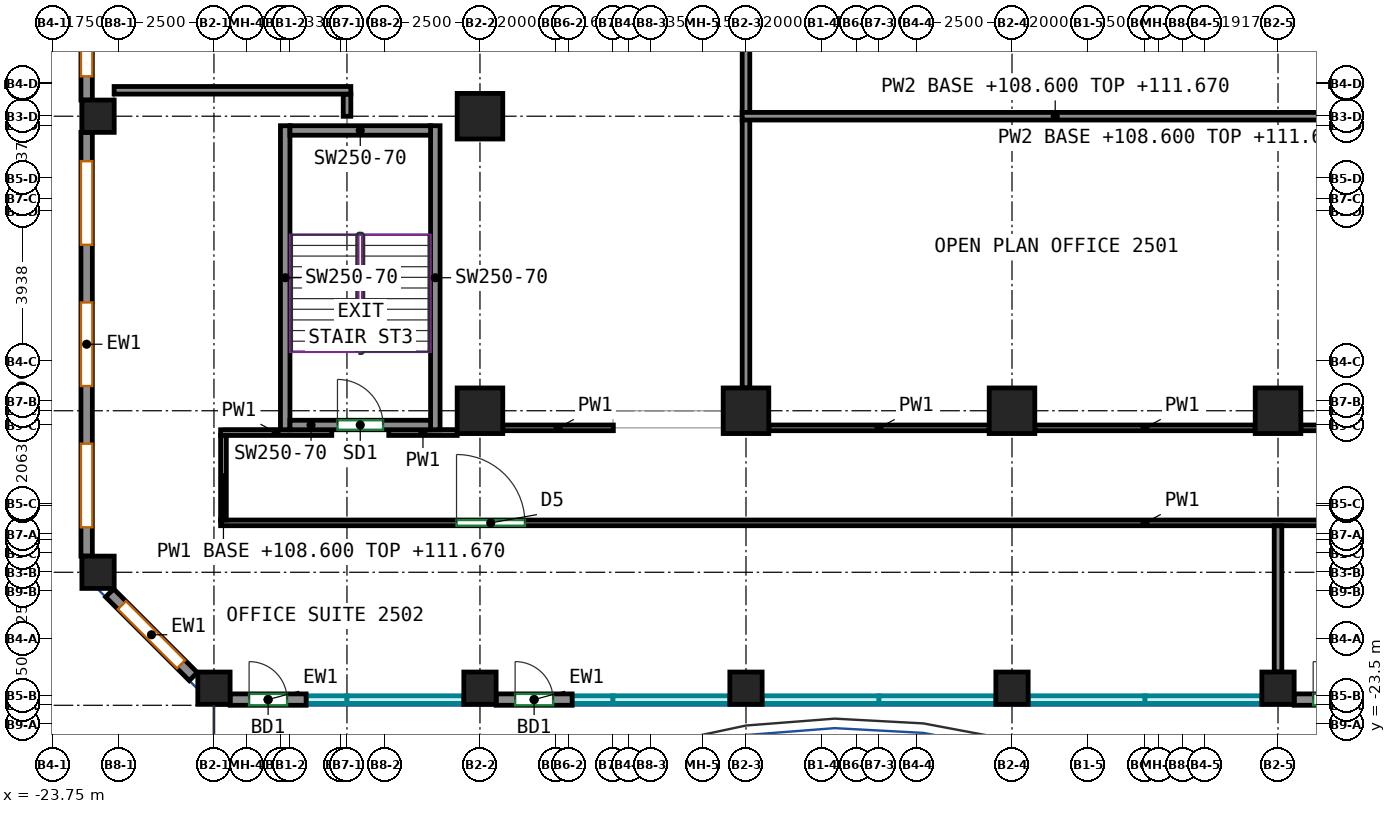
"""IFC4 building model, lengths in metres.
Left out: names, types, materials, properties, quantities, classifications, styles, units other than length and angle.
Written with IfcOpenShell. Run it as: python <this file> out.ifc"""

import sys

from ifc_helpers import new_model, si_unit, direction, frame, frame_2d, origin, origin_2d, place, context, subcontext, project, spatial, rectangle, extrude, source, transform, mapped, element, fill, save


model = new_model("IFC4")
c1 = context("Model", 3, precision=1e-05, world=origin(), true_north=direction((0.0, 1.0)))
c2 = subcontext(c1, "Body", "Model", "MODEL_VIEW")
j1 = project(units=[si_unit("LENGTHUNIT", "METRE"), si_unit("PLANEANGLEUNIT", "RADIAN")], contexts=[c1])
p1 = place(None, origin())
s1 = spatial("IfcSite", under=j1, at=p1, CompositionType="ELEMENT")
p2 = place(p1, origin())
s2 = spatial("IfcBuilding", under=s1, at=p2, CompositionType="ELEMENT")
p3 = place(p2, frame((0.0, 0.0, 108.6)))
s3 = spatial("IfcBuildingStorey", under=s2, at=p3, CompositionType="ELEMENT", Elevation=108.6)
m1 = source(origin(), c2, "Body", "SweptSolid", [
    extrude(rectangle(XDim=0.85, YDim=0.85, at=origin_2d()), origin(), (0.0, 0.0, 1.0), 3.72),
])
for number, where, z_axis, x_axis in (
    (1, (-22.55, -19.5, 0.0), (0.0, 0.0, 1.0), (1.0, 0.0, 0.0)),
    (2, (-22.55, -7.5, 0.0), (0.0, 0.0, 1.0), (1.0, 0.0, 0.0)),
    (3, (-19.5, -22.55, 0.0), (0.0, 0.0, 1.0), (1.0, 0.0, 0.0)),
    (4, (-12.5, -22.55, 0.0), (0.0, 0.0, 1.0), (1.0, 0.0, 0.0)),
):
    element("IfcColumn", number, at=place(p3, frame(where, z_axis=z_axis, x_axis=x_axis)), inside=s3, PredefinedType="COLUMN", context=c2, shape_type="MappedRepresentation", body=[
        mapped(m1, transform((0.0, 0.0, 0.0))),
    ])
m2 = source(origin(), c2, "Body", "SweptSolid", [
    extrude(rectangle(XDim=1.2, YDim=1.2, at=origin_2d()), origin(), (0.0, 0.0, 1.0), 3.72),
])
for number, where, z_axis, x_axis in (
    (5, (-12.5, -15.25, 0.0), (0.0, 0.0, 1.0), (1.0, 0.0, 0.0)),
    (6, (-12.5, -7.5, 0.0), (0.0, 0.0, 1.0), (1.0, 0.0, 0.0)),
):
    element("IfcColumn", number, at=place(p3, frame(where, z_axis=z_axis, x_axis=x_axis)), inside=s3, PredefinedType="COLUMN", context=c2, shape_type="MappedRepresentation", body=[
        mapped(m2, transform((0.0, 0.0, 0.0))),
    ])
p4 = place(p3, frame((-5.5, -22.55, 0.0), z_axis=(0.0, 0.0, 1.0), x_axis=(1.0, 0.0, 0.0)))
e7 = element("IfcColumn", 7, at=p4, inside=s3, PredefinedType="COLUMN", context=c2, shape_type="MappedRepresentation", body=[
    mapped(m1, transform((0.0, 0.0, 0.0))),
])
p5 = place(p3, frame((-5.5, -15.25, 0.0), z_axis=(0.0, 0.0, 1.0), x_axis=(1.0, 0.0, 0.0)))
e8 = element("IfcColumn", 8, at=p5, inside=s3, PredefinedType="COLUMN", context=c2, shape_type="MappedRepresentation", body=[
    mapped(m2, transform((0.0, 0.0, 0.0))),
])
p6 = place(p3, frame((1.5, -22.55, 0.0), z_axis=(0.0, 0.0, 1.0), x_axis=(1.0, 0.0, 0.0)))
e9 = element("IfcColumn", 9, at=p6, inside=s3, PredefinedType="COLUMN", context=c2, shape_type="MappedRepresentation", body=[
    mapped(m1, transform((0.0, 0.0, 0.0))),
])
p7 = place(p3, frame((1.5, -15.25, 0.0), z_axis=(0.0, 0.0, 1.0), x_axis=(1.0, 0.0, 0.0)))
e10 = element("IfcColumn", 10, at=p7, inside=s3, PredefinedType="COLUMN", context=c2, shape_type="MappedRepresentation", body=[
    mapped(m2, transform((0.0, 0.0, 0.0))),
])
p8 = place(p3, frame((8.5, -22.55, 0.0), z_axis=(0.0, 0.0, 1.0), x_axis=(1.0, 0.0, 0.0)))
e11 = element("IfcColumn", 11, at=p8, inside=s3, PredefinedType="COLUMN", context=c2, shape_type="MappedRepresentation", body=[
    mapped(m1, transform((0.0, 0.0, 0.0))),
])
p9 = place(p3, frame((8.5, -15.25, 0.0), z_axis=(0.0, 0.0, 1.0), x_axis=(1.0, 0.0, 0.0)))
e12 = element("IfcColumn", 12, at=p9, inside=s3, PredefinedType="COLUMN", context=c2, shape_type="MappedRepresentation", body=[
    mapped(m2, transform((0.0, 0.0, 0.0))),
])
m3 = source(origin(), c2, "Body", "SweptSolid", [
    extrude(rectangle(XDim=8.0, YDim=0.25, at=frame_2d((4.0, 0.0))), origin(), (0.0, 0.0, 1.0), 3.72),
])
for number, where, z_axis, x_axis in (
    (13, (-17.625, -15.75, 0.0), (0.0, 0.0, 1.0), (0.0, 1.0, 0.0)),
    (14, (-13.675, -15.75, 0.0), (0.0, 0.0, 1.0), (0.0, 1.0, 0.0)),
):
    element("IfcWall", number, at=place(p3, frame(where, z_axis=z_axis, x_axis=x_axis)), inside=s3, PredefinedType="SHEAR", context=c2, shape_type="MappedRepresentation", body=[
        mapped(m3, transform((0.0, 0.0, 0.0))),
    ])
m4 = source(origin(), c2, "Body", "SweptSolid", [
    extrude(rectangle(XDim=3.7, YDim=0.25, at=frame_2d((1.85, 0.0))), origin(), (0.0, 0.0, 1.0), 3.72),
])
p10 = place(p3, frame((-17.5, -15.625, 0.0), z_axis=(0.0, 0.0, 1.0), x_axis=(1.0, 0.0, 0.0)))
e15 = element("IfcWall", 15, at=p10, inside=s3, PredefinedType="SHEAR", context=c2, shape_type="MappedRepresentation", body=[
    mapped(m4, transform((0.0, 0.0, 0.0))),
])
p11 = place(p10, frame((1.25, 0.0, 0.0)))
e16 = element("IfcOpeningElement", 16, at=p11, cuts=e15, PredefinedType="OPENING", context=c2, shape_type="SweptSolid", body=[
    extrude(rectangle(XDim=1.2, YDim=2.1, at=frame_2d((0.6, 1.05))), frame((0.0, 0.135, 0.0), z_axis=(0.0, -1.0, 0.0), x_axis=(1.0, 0.0, 0.0)), (0.0, 0.0, 1.0), 0.27),
])
p12 = place(p3, frame((-17.5, -7.875, 0.0), z_axis=(0.0, 0.0, 1.0), x_axis=(1.0, 0.0, 0.0)))
e17 = element("IfcWall", 17, at=p12, inside=s3, PredefinedType="SHEAR", context=c2, shape_type="MappedRepresentation", body=[
    mapped(m4, transform((0.0, 0.0, 0.0))),
])
m5 = source(origin(), c2, "Body", "SweptSolid", [
    extrude(rectangle(XDim=2.0, YDim=0.3, at=frame_2d((1.0, 0.0))), origin(), (0.0, 0.0, 1.0), 3.72),
])
p13 = place(p3, frame((-19.075, -22.85, 0.0), z_axis=(0.0, 0.0, 1.0), x_axis=(1.0, 0.0, 0.0)))
e18 = element("IfcWall", 18, at=p13, inside=s3, PredefinedType="SOLIDWALL", context=c2, shape_type="MappedRepresentation", body=[
    mapped(m5, transform((0.0, 0.0, 0.0))),
])
p14 = place(p13, frame((0.5, 0.0, 0.0)))
e19 = element("IfcOpeningElement", 19, at=p14, cuts=e18, PredefinedType="OPENING", context=c2, shape_type="SweptSolid", body=[
    extrude(rectangle(XDim=1.0, YDim=2.1, at=frame_2d((0.5, 1.05))), frame((0.0, 0.16, 0.0), z_axis=(0.0, -1.0, 0.0), x_axis=(1.0, 0.0, 0.0)), (0.0, 0.0, 1.0), 0.32),
])
p15 = place(p3, frame((-12.075, -22.85, 0.0), z_axis=(0.0, 0.0, 1.0), x_axis=(1.0, 0.0, 0.0)))
e20 = element("IfcWall", 20, at=p15, inside=s3, PredefinedType="SOLIDWALL", context=c2, shape_type="MappedRepresentation", body=[
    mapped(m5, transform((0.0, 0.0, 0.0))),
])
p16 = place(p15, frame((0.5, 0.0, 0.0)))
e21 = element("IfcOpeningElement", 21, at=p16, cuts=e20, PredefinedType="OPENING", context=c2, shape_type="SweptSolid", body=[
    extrude(rectangle(XDim=1.0, YDim=2.1, at=frame_2d((0.5, 1.05))), frame((0.0, 0.16, 0.0), z_axis=(0.0, -1.0, 0.0), x_axis=(1.0, 0.0, 0.0)), (0.0, 0.0, 1.0), 0.32),
])
p17 = place(p3, frame((8.925, -22.85, 0.0), z_axis=(0.0, 0.0, 1.0), x_axis=(1.0, 0.0, 0.0)))
e22 = element("IfcWall", 22, at=p17, inside=s3, PredefinedType="SOLIDWALL", context=c2, shape_type="MappedRepresentation", body=[
    mapped(m5, transform((0.0, 0.0, 0.0))),
])
p18 = place(p17, frame((0.5, 0.0, 0.0)))
e23 = element("IfcOpeningElement", 23, at=p18, cuts=e22, PredefinedType="OPENING", context=c2, shape_type="SweptSolid", body=[
    extrude(rectangle(XDim=1.0, YDim=2.1, at=frame_2d((0.5, 1.05))), frame((0.0, 0.16, 0.0), z_axis=(0.0, -1.0, 0.0), x_axis=(1.0, 0.0, 0.0)), (0.0, 0.0, 1.0), 0.32),
])
m6 = source(origin(), c2, "Body", "SweptSolid", [
    extrude(rectangle(XDim=6.9, YDim=0.3, at=frame_2d((3.45, 0.0))), origin(), (0.0, 0.0, 1.0), 3.72),
])
p19 = place(p3, frame((-22.85, -0.175, 0.0), z_axis=(0.0, 0.0, 1.0), x_axis=(0.0, -1.0, 0.0)))
e24 = element("IfcWall", 24, at=p19, inside=s3, PredefinedType="SOLIDWALL", context=c2, shape_type="MappedRepresentation", body=[
    mapped(m6, transform((0.0, 0.0, 0.0))),
])
p20 = place(p19, frame((0.625, 0.0, 0.7)))
e25 = element("IfcOpeningElement", 25, at=p20, cuts=e24, PredefinedType="OPENING", context=c2, shape_type="SweptSolid", body=[
    extrude(rectangle(XDim=2.2, YDim=2.25, at=frame_2d((1.1, 1.125))), frame((0.0, 0.16, 0.0), z_axis=(0.0, -1.0, 0.0), x_axis=(1.0, 0.0, 0.0)), (0.0, 0.0, 1.0), 0.32),
])
p21 = place(p19, frame((4.075, 0.0, 0.7)))
e26 = element("IfcOpeningElement", 26, at=p21, cuts=e24, PredefinedType="OPENING", context=c2, shape_type="SweptSolid", body=[
    extrude(rectangle(XDim=2.2, YDim=2.25, at=frame_2d((1.1, 1.125))), frame((0.0, 0.16, 0.0), z_axis=(0.0, -1.0, 0.0), x_axis=(1.0, 0.0, 0.0)), (0.0, 0.0, 1.0), 0.32),
])
m7 = source(origin(), c2, "Body", "SweptSolid", [
    extrude(rectangle(XDim=11.15, YDim=0.3, at=frame_2d((5.575, 0.0))), origin(), (0.0, 0.0, 1.0), 3.72),
])
p22 = place(p3, frame((-22.85, -7.925, 0.0), z_axis=(0.0, 0.0, 1.0), x_axis=(0.0, -1.0, 0.0)))
e27 = element("IfcWall", 27, at=p22, inside=s3, PredefinedType="SOLIDWALL", context=c2, shape_type="MappedRepresentation", body=[
    mapped(m7, transform((0.0, 0.0, 0.0))),
])
p23 = place(p22, frame((0.758, 0.0, 0.7)))
e28 = element("IfcOpeningElement", 28, at=p23, cuts=e27, PredefinedType="OPENING", context=c2, shape_type="SweptSolid", body=[
    extrude(rectangle(XDim=2.2, YDim=2.25, at=frame_2d((1.1, 1.125))), frame((0.0, 0.16, 0.0), z_axis=(0.0, -1.0, 0.0), x_axis=(1.0, 0.0, 0.0)), (0.0, 0.0, 1.0), 0.32),
])
p24 = place(p22, frame((4.475, 0.0, 0.7)))
e29 = element("IfcOpeningElement", 29, at=p24, cuts=e27, PredefinedType="OPENING", context=c2, shape_type="SweptSolid", body=[
    extrude(rectangle(XDim=2.2, YDim=2.25, at=frame_2d((1.1, 1.125))), frame((0.0, 0.16, 0.0), z_axis=(0.0, -1.0, 0.0), x_axis=(1.0, 0.0, 0.0)), (0.0, 0.0, 1.0), 0.32),
])
p25 = place(p22, frame((8.192, 0.0, 0.7)))
e30 = element("IfcOpeningElement", 30, at=p25, cuts=e27, PredefinedType="OPENING", context=c2, shape_type="SweptSolid", body=[
    extrude(rectangle(XDim=2.2, YDim=2.25, at=frame_2d((1.1, 1.125))), frame((0.0, 0.16, 0.0), z_axis=(0.0, -1.0, 0.0), x_axis=(1.0, 0.0, 0.0)), (0.0, 0.0, 1.0), 0.32),
])
m8 = source(origin(), c2, "Body", "SweptSolid", [
    extrude(rectangle(XDim=3.111, YDim=0.3, at=frame_2d((1.556, 0.0))), origin(), (0.0, 0.0, 1.0), 3.72),
])
p26 = place(p3, frame((-22.244, -20.044, 0.0), z_axis=(0.0, 0.0, 1.0), x_axis=(0.707106781187, -0.707106781187, 0.0)))
e31 = element("IfcWall", 31, at=p26, inside=s3, PredefinedType="SOLIDWALL", context=c2, shape_type="MappedRepresentation", body=[
    mapped(m8, transform((0.0, 0.0, 0.0))),
])
p27 = place(p26, frame((0.456, 0.0, 0.7)))
e32 = element("IfcOpeningElement", 32, at=p27, cuts=e31, PredefinedType="OPENING", context=c2, shape_type="SweptSolid", body=[
    extrude(rectangle(XDim=2.2, YDim=2.25, at=frame_2d((1.1, 1.125))), frame((0.0, 0.16, 0.0), z_axis=(0.0, -1.0, 0.0), x_axis=(1.0, 0.0, 0.0)), (0.0, 0.0, 1.0), 0.32),
])
p28 = place(p3, frame((-14.9, -15.825, 0.0), z_axis=(0.0, 0.0, 1.0), x_axis=(1.0, 0.0, 0.0)))
e33 = element("IfcWall", 33, at=p28, inside=s3, PredefinedType="PARTITIONING", context=c2, shape_type="SweptSolid", body=[
    extrude(rectangle(XDim=1.8, YDim=0.15, at=frame_2d((0.9, 0.0))), origin(), (0.0, 0.0, 1.0), 3.72),
])
p29 = place(p3, frame((-11.9, -15.7, 0.0), z_axis=(0.0, 0.0, 1.0), x_axis=(1.0, 0.0, 0.0)))
e34 = element("IfcWall", 34, at=p29, inside=s3, PredefinedType="PARTITIONING", context=c2, shape_type="SweptSolid", body=[
    extrude(rectangle(XDim=2.91, YDim=0.15, at=frame_2d((1.455, 0.0))), origin(), (0.0, 0.0, 1.0), 3.72),
])
p30 = place(p3, frame((-19.325, -18.2, 0.0), z_axis=(0.0, 0.0, 1.0), x_axis=(1.0, 0.0, 0.0)))
e35 = element("IfcWall", 35, at=p30, inside=s3, PredefinedType="PARTITIONING", context=c2, shape_type="SweptSolid", body=[
    extrude(rectangle(XDim=48.65, YDim=0.15, at=frame_2d((24.325, 0.0))), origin(), (0.0, 0.0, 1.0), 3.72),
])
p31 = place(p30, frame((6.208, 0.0, 0.0)))
e36 = element("IfcOpeningElement", 36, at=p31, cuts=e35, PredefinedType="OPENING", context=c2, shape_type="SweptSolid", body=[
    extrude(rectangle(XDim=1.8, YDim=2.1, at=frame_2d((0.9, 1.05))), frame((0.0, 0.085, 0.0), z_axis=(0.0, -1.0, 0.0), x_axis=(1.0, 0.0, 0.0)), (0.0, 0.0, 1.0), 0.17),
])
p32 = place(p30, frame((29.32, 0.0, 0.0)))
e37 = element("IfcOpeningElement", 37, at=p32, cuts=e35, PredefinedType="OPENING", context=c2, shape_type="SweptSolid", body=[
    extrude(rectangle(XDim=0.9, YDim=2.1, at=frame_2d((0.45, 1.05))), frame((0.0, 0.085, 0.0), z_axis=(0.0, -1.0, 0.0), x_axis=(1.0, 0.0, 0.0)), (0.0, 0.0, 1.0), 0.17),
])
p33 = place(p30, frame((38.725, 0.0, 0.0)))
e38 = element("IfcOpeningElement", 38, at=p33, cuts=e35, PredefinedType="OPENING", context=c2, shape_type="SweptSolid", body=[
    extrude(rectangle(XDim=1.0, YDim=2.1, at=frame_2d((0.5, 1.05))), frame((0.0, 0.085, 0.0), z_axis=(0.0, -1.0, 0.0), x_axis=(1.0, 0.0, 0.0)), (0.0, 0.0, 1.0), 0.17),
])
p34 = place(p3, frame((-19.25, -15.9, 0.0), z_axis=(0.0, 0.0, 1.0), x_axis=(0.0, -1.0, 0.0)))
e39 = element("IfcWall", 39, at=p34, inside=s3, PredefinedType="PARTITIONING", context=c2, shape_type="SweptSolid", body=[
    extrude(rectangle(XDim=2.225, YDim=0.15, at=frame_2d((1.113, 0.0))), origin(), (0.0, 0.0, 1.0), 3.07),
])
p35 = place(p3, frame((-19.325, -15.825, 0.0), z_axis=(0.0, 0.0, 1.0), x_axis=(1.0, 0.0, 0.0)))
e40 = element("IfcWall", 40, at=p35, inside=s3, PredefinedType="PARTITIONING", context=c2, shape_type="SweptSolid", body=[
    extrude(rectangle(XDim=2.925, YDim=0.15, at=frame_2d((1.462, 0.0))), origin(), (0.0, 0.0, 1.0), 3.72),
])
for number, where, z_axis, x_axis in (
    (41, (-4.9, -15.7, 0.0), (0.0, 0.0, 1.0), (1.0, 0.0, 0.0)),
    (42, (2.1, -15.7, 0.0), (0.0, 0.0, 1.0), (1.0, 0.0, 0.0)),
):
    element("IfcWall", number, at=place(p3, frame(where, z_axis=z_axis, x_axis=x_axis)), inside=s3, PredefinedType="PARTITIONING", context=c2, shape_type="SweptSolid", body=[
        extrude(rectangle(XDim=5.8, YDim=0.15, at=frame_2d((2.9, 0.0))), origin(), (0.0, 0.0, 1.0), 3.72),
    ])
p36 = place(p3, frame((9.1, -15.7, 0.0), z_axis=(0.0, 0.0, 1.0), x_axis=(1.0, 0.0, 0.0)))
e43 = element("IfcWall", 43, at=p36, inside=s3, PredefinedType="PARTITIONING", context=c2, shape_type="SweptSolid", body=[
    extrude(rectangle(XDim=1.775, YDim=0.15, at=frame_2d((0.887, 0.0))), origin(), (0.0, 0.0, 1.0), 3.72),
])
p37 = place(p3, frame((-15.998, -6.918, 0.0), z_axis=(0.0, 0.0, 1.0), x_axis=(0.0, -1.0, 0.0)))
e44 = element("IfcWall", 44, at=p37, inside=s3, PredefinedType="PARTITIONING", context=c2, shape_type="SweptSolid", body=[
    extrude(rectangle(XDim=0.584, YDim=0.2, at=frame_2d((0.292, 0.0))), origin(), (0.0, 0.0, 1.0), 3.72),
])
p38 = place(p3, frame((-22.127, -6.818, 0.0), z_axis=(0.0, 0.0, 1.0), x_axis=(1.0, 0.0, 0.0)))
e45 = element("IfcWall", 45, at=p38, inside=s3, PredefinedType="PARTITIONING", context=c2, shape_type="SweptSolid", body=[
    extrude(rectangle(XDim=6.229, YDim=0.2, at=frame_2d((3.115, 0.0))), origin(), (0.0, 0.0, 1.0), 3.72),
])
p39 = place(p3, frame((-5.5, -14.65, 0.0), z_axis=(0.0, 0.0, 1.0), x_axis=(0.0, 1.0, 0.0)))
e46 = element("IfcWall", 46, at=p39, inside=s3, PredefinedType="PARTITIONING", context=c2, shape_type="SweptSolid", body=[
    extrude(rectangle(XDim=7.06, YDim=0.2, at=frame_2d((3.53, 0.0))), origin(), (0.0, 0.0, 1.0), 3.72),
])
p40 = place(p3, frame((-5.5, -7.41, 0.0), z_axis=(0.0, 0.0, 1.0), x_axis=(0.0, 1.0, 0.0)))
e47 = element("IfcWall", 47, at=p40, inside=s3, PredefinedType="PARTITIONING", context=c2, shape_type="SweptSolid", body=[
    extrude(rectangle(XDim=3.685, YDim=0.2, at=frame_2d((1.842, 0.0))), origin(), (0.0, 0.0, 1.0), 3.72),
])
p41 = place(p3, frame((8.5, -22.125, 0.0), z_axis=(0.0, 0.0, 1.0), x_axis=(0.0, 1.0, 0.0)))
e48 = element("IfcWall", 48, at=p41, inside=s3, PredefinedType="PARTITIONING", context=c2, shape_type="SweptSolid", body=[
    extrude(rectangle(XDim=3.849, YDim=0.2, at=frame_2d((1.925, 0.0))), origin(), (0.0, 0.0, 1.0), 3.72),
])
p42 = place(p3, frame((-5.6, -7.5, 0.0), z_axis=(0.0, 0.0, 1.0), x_axis=(1.0, 0.0, 0.0)))
e49 = element("IfcWall", 49, at=p42, inside=s3, PredefinedType="PARTITIONING", context=c2, shape_type="SweptSolid", body=[
    extrude(rectangle(XDim=16.474, YDim=0.2, at=frame_2d((8.237, 0.0))), origin(), (0.0, 0.0, 1.0), 3.07),
])
p43 = place(p14, origin())
e50 = element("IfcDoor", 50, at=p43, inside=s3, OperationType="SINGLE_SWING_LEFT", PredefinedType="DOOR", context=c2, shape_type="SweptSolid", body=[
    extrude(rectangle(XDim=1.0, YDim=2.1, at=frame_2d((0.5, 1.05))), frame((0.0, 0.025, 0.0), z_axis=(0.0, -1.0, 0.0), x_axis=(1.0, 0.0, 0.0)), (0.0, 0.0, 1.0), 0.05),
])
fill(e19, e50)
p44 = place(p16, origin())
e51 = element("IfcDoor", 51, at=p44, inside=s3, OperationType="SINGLE_SWING_LEFT", PredefinedType="DOOR", context=c2, shape_type="SweptSolid", body=[
    extrude(rectangle(XDim=1.0, YDim=2.1, at=frame_2d((0.5, 1.05))), frame((0.0, 0.025, 0.0), z_axis=(0.0, -1.0, 0.0), x_axis=(1.0, 0.0, 0.0)), (0.0, 0.0, 1.0), 0.05),
])
fill(e21, e51)
p45 = place(p18, origin())
e52 = element("IfcDoor", 52, at=p45, inside=s3, OperationType="SINGLE_SWING_LEFT", PredefinedType="DOOR", context=c2, shape_type="SweptSolid", body=[
    extrude(rectangle(XDim=1.0, YDim=2.1, at=frame_2d((0.5, 1.05))), frame((0.0, 0.025, 0.0), z_axis=(0.0, -1.0, 0.0), x_axis=(1.0, 0.0, 0.0)), (0.0, 0.0, 1.0), 0.05),
])
fill(e23, e52)
p46 = place(p21, origin())
e53 = element("IfcWindow", 53, at=p46, inside=s3, PartitioningType="SINGLE_PANEL", PredefinedType="WINDOW", context=c2, shape_type="SweptSolid", body=[
    extrude(rectangle(XDim=2.2, YDim=2.25, at=frame_2d((1.1, 1.125))), frame((0.0, 0.03, 0.0), z_axis=(0.0, -1.0, 0.0), x_axis=(1.0, 0.0, 0.0)), (0.0, 0.0, 1.0), 0.06),
])
fill(e26, e53)
p47 = place(p23, origin())
e54 = element("IfcWindow", 54, at=p47, inside=s3, PartitioningType="SINGLE_PANEL", PredefinedType="WINDOW", context=c2, shape_type="SweptSolid", body=[
    extrude(rectangle(XDim=2.2, YDim=2.25, at=frame_2d((1.1, 1.125))), frame((0.0, 0.03, 0.0), z_axis=(0.0, -1.0, 0.0), x_axis=(1.0, 0.0, 0.0)), (0.0, 0.0, 1.0), 0.06),
])
fill(e28, e54)
p48 = place(p24, origin())
e55 = element("IfcWindow", 55, at=p48, inside=s3, PartitioningType="SINGLE_PANEL", PredefinedType="WINDOW", context=c2, shape_type="SweptSolid", body=[
    extrude(rectangle(XDim=2.2, YDim=2.25, at=frame_2d((1.1, 1.125))), frame((0.0, 0.03, 0.0), z_axis=(0.0, -1.0, 0.0), x_axis=(1.0, 0.0, 0.0)), (0.0, 0.0, 1.0), 0.06),
])
fill(e29, e55)
p49 = place(p25, origin())
e56 = element("IfcWindow", 56, at=p49, inside=s3, PartitioningType="SINGLE_PANEL", PredefinedType="WINDOW", context=c2, shape_type="SweptSolid", body=[
    extrude(rectangle(XDim=2.2, YDim=2.25, at=frame_2d((1.1, 1.125))), frame((0.0, 0.03, 0.0), z_axis=(0.0, -1.0, 0.0), x_axis=(1.0, 0.0, 0.0)), (0.0, 0.0, 1.0), 0.06),
])
fill(e30, e56)
p50 = place(p27, origin())
e57 = element("IfcWindow", 57, at=p50, inside=s3, PartitioningType="SINGLE_PANEL", PredefinedType="WINDOW", context=c2, shape_type="SweptSolid", body=[
    extrude(rectangle(XDim=2.2, YDim=2.25, at=frame_2d((1.1, 1.125))), frame((0.0, 0.03, 0.0), z_axis=(0.0, -1.0, 0.0), x_axis=(1.0, 0.0, 0.0)), (0.0, 0.0, 1.0), 0.06),
])
fill(e32, e57)
p51 = place(p11, origin())
e58 = element("IfcDoor", 58, at=p51, inside=s3, OperationType="DOUBLE_DOOR_SINGLE_SWING", PredefinedType="DOOR", context=c2, shape_type="SweptSolid", body=[
    extrude(rectangle(XDim=1.2, YDim=2.1, at=frame_2d((0.6, 1.05))), frame((0.0, 0.025, 0.0), z_axis=(0.0, -1.0, 0.0), x_axis=(1.0, 0.0, 0.0)), (0.0, 0.0, 1.0), 0.05),
])
fill(e16, e58)
p52 = place(p31, origin())
e59 = element("IfcDoor", 59, at=p52, inside=s3, OperationType="DOUBLE_DOOR_SINGLE_SWING", PredefinedType="DOOR", context=c2, shape_type="SweptSolid", body=[
    extrude(rectangle(XDim=1.8, YDim=2.1, at=frame_2d((0.9, 1.05))), frame((0.0, 0.025, 0.0), z_axis=(0.0, -1.0, 0.0), x_axis=(1.0, 0.0, 0.0)), (0.0, 0.0, 1.0), 0.05),
])
fill(e36, e59)
save(model, sys.argv[1])
